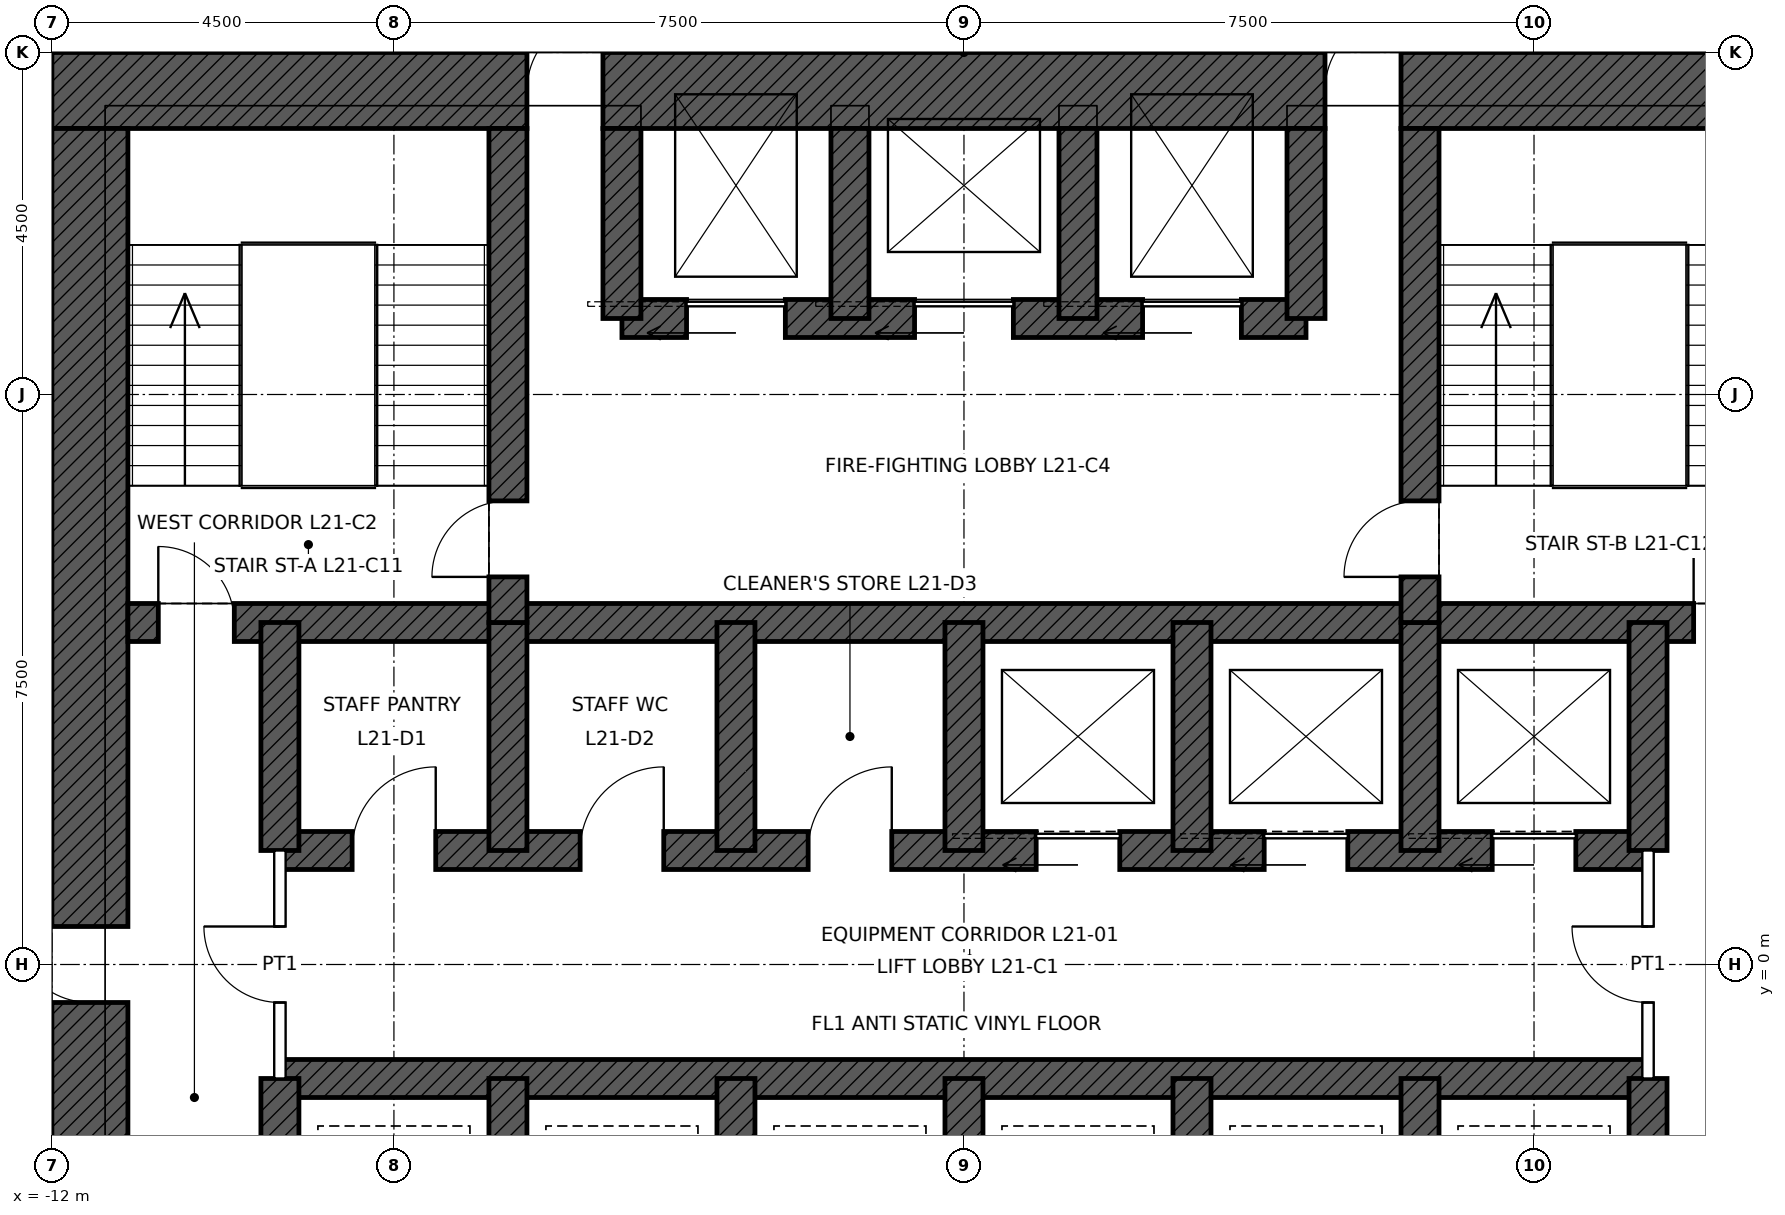
"""IFC4 building model, lengths in metres.
Left out: names, types, materials, properties, quantities, classifications, styles, units other than length and angle.
Written with IfcOpenShell. Run it as: python <this file> out.ifc"""

import sys

from ifc_helpers import new_model, si_unit, direction, frame, frame_2d, origin, place, context, subcontext, project, spatial, rectangle, extrude, element, fill, save


model = new_model("IFC4")
c1 = context("Model", 3, precision=1e-05, world=origin(), true_north=direction((0.0, 1.0)))
c2 = subcontext(c1, "Body", "Model", "MODEL_VIEW")
j1 = project(units=[si_unit("LENGTHUNIT", "METRE"), si_unit("PLANEANGLEUNIT", "RADIAN")], contexts=[c1])
p1 = place(None, origin())
s1 = spatial("IfcSite", under=j1, at=p1, CompositionType="ELEMENT")
p2 = place(p1, origin())
s2 = spatial("IfcBuilding", under=s1, at=p2, CompositionType="ELEMENT")
p3 = place(p2, frame((0.0, 0.0, 108.9)))
s3 = spatial("IfcBuildingStorey", under=s2, at=p3, CompositionType="ELEMENT", Elevation=108.9)
p4 = place(p3, frame((-12.0, 11.5, 0.0), z_axis=(0.0, 0.0, 1.0), x_axis=(1.0, 0.0, 0.0)))
e1 = element("IfcWall", 1, at=p4, inside=s3, PredefinedType="SHEAR", context=c2, shape_type="SweptSolid", body=[
    extrude(rectangle(XDim=24.0, YDim=1.0, at=frame_2d((12.0, 0.0))), origin(), (0.0, 0.0, 1.0), 4.5),
])
p5 = place(p4, frame((6.25, 0.0, 0.0)))
e2 = element("IfcOpeningElement", 2, at=p5, cuts=e1, PredefinedType="OPENING", context=c2, shape_type="SweptSolid", body=[
    extrude(rectangle(XDim=1.0, YDim=2.4, at=frame_2d((0.5, 1.2))), frame((0.0, 0.51, 0.0), z_axis=(0.0, -1.0, 0.0), x_axis=(1.0, 0.0, 0.0)), (0.0, 0.0, 1.0), 1.02),
])
p6 = place(p4, frame((16.75, 0.0, 0.0)))
e3 = element("IfcOpeningElement", 3, at=p6, cuts=e1, PredefinedType="OPENING", context=c2, shape_type="SweptSolid", body=[
    extrude(rectangle(XDim=1.0, YDim=2.4, at=frame_2d((0.5, 1.2))), frame((0.0, 0.51, 0.0), z_axis=(0.0, -1.0, 0.0), x_axis=(1.0, 0.0, 0.0)), (0.0, 0.0, 1.0), 1.02),
])
p7 = place(p3, frame((-11.5, -11.0, 0.0), z_axis=(0.0, 0.0, 1.0), x_axis=(0.0, 1.0, 0.0)))
e4 = element("IfcWall", 4, at=p7, inside=s3, PredefinedType="SHEAR", context=c2, shape_type="SweptSolid", body=[
    extrude(rectangle(XDim=22.0, YDim=1.0, at=frame_2d((11.0, 0.0))), origin(), (0.0, 0.0, 1.0), 4.5),
])
p8 = place(p7, frame((10.5, 0.0, 0.0)))
e5 = element("IfcOpeningElement", 5, at=p8, cuts=e4, PredefinedType="OPENING", context=c2, shape_type="SweptSolid", body=[
    extrude(rectangle(XDim=1.0, YDim=2.4, at=frame_2d((0.5, 1.2))), frame((0.0, 0.51, 0.0), z_axis=(0.0, -1.0, 0.0), x_axis=(1.0, 0.0, 0.0)), (0.0, 0.0, 1.0), 1.02),
])
p9 = place(p3, frame((-11.0, 4.5, 0.0), z_axis=(0.0, 0.0, 1.0), x_axis=(1.0, 0.0, 0.0)))
e6 = element("IfcWall", 6, at=p9, inside=s3, PredefinedType="SHEAR", context=c2, shape_type="SweptSolid", body=[
    extrude(rectangle(XDim=22.0, YDim=0.5, at=frame_2d((11.0, 0.0))), origin(), (0.0, 0.0, 1.0), 4.5),
])
p10 = place(p9, frame((0.4, 0.0, 0.0)))
e7 = element("IfcOpeningElement", 7, at=p10, cuts=e6, PredefinedType="OPENING", context=c2, shape_type="SweptSolid", body=[
    extrude(rectangle(XDim=1.0, YDim=2.1, at=frame_2d((0.5, 1.05))), frame((0.0, 0.26, 0.0), z_axis=(0.0, -1.0, 0.0), x_axis=(1.0, 0.0, 0.0)), (0.0, 0.0, 1.0), 0.52),
])
p11 = place(p9, frame((20.6, 0.0, 0.0)))
e8 = element("IfcOpeningElement", 8, at=p11, cuts=e6, PredefinedType="OPENING", context=c2, shape_type="SweptSolid", body=[
    extrude(rectangle(XDim=1.0, YDim=2.1, at=frame_2d((0.5, 1.05))), frame((0.0, 0.26, 0.0), z_axis=(0.0, -1.0, 0.0), x_axis=(1.0, 0.0, 0.0)), (0.0, 0.0, 1.0), 0.52),
])
p12 = place(p3, frame((-9.0, 1.5, 0.0), z_axis=(0.0, 0.0, 1.0), x_axis=(1.0, 0.0, 0.0)))
e9 = element("IfcWall", 9, at=p12, inside=s3, PredefinedType="SHEAR", context=c2, shape_type="SweptSolid", body=[
    extrude(rectangle(XDim=18.0, YDim=0.5, at=frame_2d((9.0, 0.0))), origin(), (0.0, 0.0, 1.0), 4.5),
])
p13 = place(p12, frame((9.95, 0.0, 0.0)))
e10 = element("IfcOpeningElement", 10, at=p13, cuts=e9, PredefinedType="OPENING", context=c2, shape_type="SweptSolid", body=[
    extrude(rectangle(XDim=1.1, YDim=2.1, at=frame_2d((0.55, 1.05))), frame((0.0, 0.26, 0.0), z_axis=(0.0, -1.0, 0.0), x_axis=(1.0, 0.0, 0.0)), (0.0, 0.0, 1.0), 0.52),
])
p14 = place(p12, frame((12.95, 0.0, 0.0)))
e11 = element("IfcOpeningElement", 11, at=p14, cuts=e9, PredefinedType="OPENING", context=c2, shape_type="SweptSolid", body=[
    extrude(rectangle(XDim=1.1, YDim=2.1, at=frame_2d((0.55, 1.05))), frame((0.0, 0.26, 0.0), z_axis=(0.0, -1.0, 0.0), x_axis=(1.0, 0.0, 0.0)), (0.0, 0.0, 1.0), 0.52),
])
p15 = place(p12, frame((15.95, 0.0, 0.0)))
e12 = element("IfcOpeningElement", 12, at=p15, cuts=e9, PredefinedType="OPENING", context=c2, shape_type="SweptSolid", body=[
    extrude(rectangle(XDim=1.1, YDim=2.1, at=frame_2d((0.55, 1.05))), frame((0.0, 0.26, 0.0), z_axis=(0.0, -1.0, 0.0), x_axis=(1.0, 0.0, 0.0)), (0.0, 0.0, 1.0), 0.52),
])
p16 = place(p12, frame((0.95, 0.0, 0.0)))
e13 = element("IfcOpeningElement", 13, at=p16, cuts=e9, PredefinedType="OPENING", context=c2, shape_type="SweptSolid", body=[
    extrude(rectangle(XDim=1.1, YDim=2.1, at=frame_2d((0.55, 1.05))), frame((0.0, 0.26, 0.0), z_axis=(0.0, -1.0, 0.0), x_axis=(1.0, 0.0, 0.0)), (0.0, 0.0, 1.0), 0.52),
])
p17 = place(p12, frame((3.95, 0.0, 0.0)))
e14 = element("IfcOpeningElement", 14, at=p17, cuts=e9, PredefinedType="OPENING", context=c2, shape_type="SweptSolid", body=[
    extrude(rectangle(XDim=1.1, YDim=2.1, at=frame_2d((0.55, 1.05))), frame((0.0, 0.26, 0.0), z_axis=(0.0, -1.0, 0.0), x_axis=(1.0, 0.0, 0.0)), (0.0, 0.0, 1.0), 0.52),
])
p18 = place(p12, frame((6.95, 0.0, 0.0)))
e15 = element("IfcOpeningElement", 15, at=p18, cuts=e9, PredefinedType="OPENING", context=c2, shape_type="SweptSolid", body=[
    extrude(rectangle(XDim=1.1, YDim=2.1, at=frame_2d((0.55, 1.05))), frame((0.0, 0.26, 0.0), z_axis=(0.0, -1.0, 0.0), x_axis=(1.0, 0.0, 0.0)), (0.0, 0.0, 1.0), 0.52),
])
p19 = place(p3, frame((-9.0, -1.5, 0.0), z_axis=(0.0, 0.0, 1.0), x_axis=(1.0, 0.0, 0.0)))
e16 = element("IfcWall", 16, at=p19, inside=s3, PredefinedType="SHEAR", context=c2, shape_type="SweptSolid", body=[
    extrude(rectangle(XDim=18.0, YDim=0.5, at=frame_2d((9.0, 0.0))), origin(), (0.0, 0.0, 1.0), 4.5),
])
p20 = place(p3, frame((-4.5, 8.5, 0.0), z_axis=(0.0, 0.0, 1.0), x_axis=(1.0, 0.0, 0.0)))
e17 = element("IfcWall", 17, at=p20, inside=s3, PredefinedType="SHEAR", context=c2, shape_type="SweptSolid", body=[
    extrude(rectangle(XDim=9.0, YDim=0.5, at=frame_2d((4.5, 0.0))), origin(), (0.0, 0.0, 1.0), 4.5),
])
p21 = place(p20, frame((0.85, 0.0, 0.0)))
e18 = element("IfcOpeningElement", 18, at=p21, cuts=e17, PredefinedType="OPENING", context=c2, shape_type="SweptSolid", body=[
    extrude(rectangle(XDim=1.3, YDim=2.4, at=frame_2d((0.65, 1.2))), frame((0.0, 0.26, 0.0), z_axis=(0.0, -1.0, 0.0), x_axis=(1.0, 0.0, 0.0)), (0.0, 0.0, 1.0), 0.52),
])
p22 = place(p20, frame((6.85, 0.0, 0.0)))
e19 = element("IfcOpeningElement", 19, at=p22, cuts=e17, PredefinedType="OPENING", context=c2, shape_type="SweptSolid", body=[
    extrude(rectangle(XDim=1.3, YDim=2.4, at=frame_2d((0.65, 1.2))), frame((0.0, 0.26, 0.0), z_axis=(0.0, -1.0, 0.0), x_axis=(1.0, 0.0, 0.0)), (0.0, 0.0, 1.0), 0.52),
])
p23 = place(p20, frame((3.85, 0.0, 0.0)))
e20 = element("IfcOpeningElement", 20, at=p23, cuts=e17, PredefinedType="OPENING", context=c2, shape_type="SweptSolid", body=[
    extrude(rectangle(XDim=1.3, YDim=2.4, at=frame_2d((0.65, 1.2))), frame((0.0, 0.26, 0.0), z_axis=(0.0, -1.0, 0.0), x_axis=(1.0, 0.0, 0.0)), (0.0, 0.0, 1.0), 0.52),
])
for number, where, z_axis, x_axis in (
    (21, (-9.0, 1.5, 0.0), (0.0, 0.0, 1.0), (0.0, 1.0, 0.0)),
    (22, (9.0, 1.5, 0.0), (0.0, 0.0, 1.0), (0.0, 1.0, 0.0)),
    (23, (-9.0, -4.5, 0.0), (0.0, 0.0, 1.0), (0.0, 1.0, 0.0)),
    (24, (9.0, -4.5, 0.0), (0.0, 0.0, 1.0), (0.0, 1.0, 0.0)),
    (25, (-6.0, 1.5, 0.0), (0.0, 0.0, 1.0), (0.0, 1.0, 0.0)),
    (26, (-3.0, 1.5, 0.0), (0.0, 0.0, 1.0), (0.0, 1.0, 0.0)),
    (27, (0.0, 1.5, 0.0), (0.0, 0.0, 1.0), (0.0, 1.0, 0.0)),
    (28, (3.0, 1.5, 0.0), (0.0, 0.0, 1.0), (0.0, 1.0, 0.0)),
    (29, (6.0, 1.5, 0.0), (0.0, 0.0, 1.0), (0.0, 1.0, 0.0)),
    (30, (-6.0, -4.5, 0.0), (0.0, 0.0, 1.0), (0.0, 1.0, 0.0)),
    (31, (-3.0, -4.5, 0.0), (0.0, 0.0, 1.0), (0.0, 1.0, 0.0)),
    (32, (0.0, -4.5, 0.0), (0.0, 0.0, 1.0), (0.0, 1.0, 0.0)),
    (33, (3.0, -4.5, 0.0), (0.0, 0.0, 1.0), (0.0, 1.0, 0.0)),
    (34, (6.0, -4.5, 0.0), (0.0, 0.0, 1.0), (0.0, 1.0, 0.0)),
):
    element("IfcWall", number, at=place(p3, frame(where, z_axis=z_axis, x_axis=x_axis)), inside=s3, PredefinedType="SHEAR", context=c2, shape_type="SweptSolid", body=[
        extrude(rectangle(XDim=3.0, YDim=0.5, at=frame_2d((1.5, 0.0))), origin(), (0.0, 0.0, 1.0), 4.5),
    ])
p24 = place(p3, frame((-6.0, 4.5, 0.0), z_axis=(0.0, 0.0, 1.0), x_axis=(0.0, 1.0, 0.0)))
e35 = element("IfcWall", 35, at=p24, inside=s3, PredefinedType="SHEAR", context=c2, shape_type="SweptSolid", body=[
    extrude(rectangle(XDim=6.5, YDim=0.5, at=frame_2d((3.25, 0.0))), origin(), (0.0, 0.0, 1.0), 4.5),
])
p25 = place(p24, frame((0.6, 0.0, 0.0)))
e36 = element("IfcOpeningElement", 36, at=p25, cuts=e35, PredefinedType="OPENING", context=c2, shape_type="SweptSolid", body=[
    extrude(rectangle(XDim=1.0, YDim=2.1, at=frame_2d((0.5, 1.05))), frame((0.0, 0.26, 0.0), z_axis=(0.0, -1.0, 0.0), x_axis=(1.0, 0.0, 0.0)), (0.0, 0.0, 1.0), 0.52),
])
p26 = place(p3, frame((6.0, 4.5, 0.0), z_axis=(0.0, 0.0, 1.0), x_axis=(0.0, 1.0, 0.0)))
e37 = element("IfcWall", 37, at=p26, inside=s3, PredefinedType="SHEAR", context=c2, shape_type="SweptSolid", body=[
    extrude(rectangle(XDim=6.5, YDim=0.5, at=frame_2d((3.25, 0.0))), origin(), (0.0, 0.0, 1.0), 4.5),
])
p27 = place(p26, frame((0.6, 0.0, 0.0)))
e38 = element("IfcOpeningElement", 38, at=p27, cuts=e37, PredefinedType="OPENING", context=c2, shape_type="SweptSolid", body=[
    extrude(rectangle(XDim=1.0, YDim=2.1, at=frame_2d((0.5, 1.05))), frame((0.0, 0.26, 0.0), z_axis=(0.0, -1.0, 0.0), x_axis=(1.0, 0.0, 0.0)), (0.0, 0.0, 1.0), 0.52),
])
for number, where, z_axis, x_axis in (
    (39, (-4.5, 8.5, 0.0), (0.0, 0.0, 1.0), (0.0, 1.0, 0.0)),
    (40, (4.5, 8.5, 0.0), (0.0, 0.0, 1.0), (0.0, 1.0, 0.0)),
    (41, (-1.5, 8.5, 0.0), (0.0, 0.0, 1.0), (0.0, 1.0, 0.0)),
    (42, (1.5, 8.5, 0.0), (0.0, 0.0, 1.0), (0.0, 1.0, 0.0)),
):
    element("IfcWall", number, at=place(p3, frame(where, z_axis=z_axis, x_axis=x_axis)), inside=s3, PredefinedType="SHEAR", context=c2, shape_type="SweptSolid", body=[
        extrude(rectangle(XDim=2.5, YDim=0.5, at=frame_2d((1.25, 0.0))), origin(), (0.0, 0.0, 1.0), 4.5),
    ])
p28 = place(p3, frame((-9.0, -1.5, 0.0), z_axis=(0.0, 0.0, 1.0), x_axis=(0.0, 1.0, 0.0)))
e43 = element("IfcWall", 43, at=p28, inside=s3, PredefinedType="PARTITIONING", context=c2, shape_type="SweptSolid", body=[
    extrude(rectangle(XDim=3.0, YDim=0.15, at=frame_2d((1.5, 0.0))), origin(), (0.0, 0.0, 1.0), 4.25),
])
p29 = place(p28, frame((1.0, 0.0, 0.0)))
e44 = element("IfcOpeningElement", 44, at=p29, cuts=e43, PredefinedType="OPENING", context=c2, shape_type="SweptSolid", body=[
    extrude(rectangle(XDim=1.0, YDim=2.4, at=frame_2d((0.5, 1.2))), frame((0.0, 0.085, 0.0), z_axis=(0.0, -1.0, 0.0), x_axis=(1.0, 0.0, 0.0)), (0.0, 0.0, 1.0), 0.17),
])
p30 = place(p3, frame((9.0, -1.5, 0.0), z_axis=(0.0, 0.0, 1.0), x_axis=(0.0, 1.0, 0.0)))
e45 = element("IfcWall", 45, at=p30, inside=s3, PredefinedType="PARTITIONING", context=c2, shape_type="SweptSolid", body=[
    extrude(rectangle(XDim=3.0, YDim=0.15, at=frame_2d((1.5, 0.0))), origin(), (0.0, 0.0, 1.0), 4.25),
])
p31 = place(p30, frame((1.0, 0.0, 0.0)))
e46 = element("IfcOpeningElement", 46, at=p31, cuts=e45, PredefinedType="OPENING", context=c2, shape_type="SweptSolid", body=[
    extrude(rectangle(XDim=1.0, YDim=2.4, at=frame_2d((0.5, 1.2))), frame((0.0, 0.085, 0.0), z_axis=(0.0, -1.0, 0.0), x_axis=(1.0, 0.0, 0.0)), (0.0, 0.0, 1.0), 0.17),
])
p32 = place(p10, origin())
e47 = element("IfcDoor", 47, at=p32, inside=s3, OperationType="SINGLE_SWING_LEFT", PredefinedType="DOOR", context=c2, shape_type="SweptSolid", body=[
    extrude(rectangle(XDim=1.0, YDim=2.1, at=frame_2d((0.5, 1.05))), frame((0.0, 0.025, 0.0), z_axis=(0.0, -1.0, 0.0), x_axis=(1.0, 0.0, 0.0)), (0.0, 0.0, 1.0), 0.05),
])
fill(e7, e47)
p33 = place(p11, origin())
e48 = element("IfcDoor", 48, at=p33, inside=s3, OperationType="SINGLE_SWING_LEFT", PredefinedType="DOOR", context=c2, shape_type="SweptSolid", body=[
    extrude(rectangle(XDim=1.0, YDim=2.1, at=frame_2d((0.5, 1.05))), frame((0.0, 0.025, 0.0), z_axis=(0.0, -1.0, 0.0), x_axis=(1.0, 0.0, 0.0)), (0.0, 0.0, 1.0), 0.05),
])
fill(e8, e48)
p34 = place(p25, origin())
e49 = element("IfcDoor", 49, at=p34, inside=s3, OperationType="SINGLE_SWING_LEFT", PredefinedType="DOOR", context=c2, shape_type="SweptSolid", body=[
    extrude(rectangle(XDim=1.0, YDim=2.1, at=frame_2d((0.5, 1.05))), frame((0.0, 0.025, 0.0), z_axis=(0.0, -1.0, 0.0), x_axis=(1.0, 0.0, 0.0)), (0.0, 0.0, 1.0), 0.05),
])
fill(e36, e49)
p35 = place(p27, origin())
e50 = element("IfcDoor", 50, at=p35, inside=s3, OperationType="SINGLE_SWING_LEFT", PredefinedType="DOOR", context=c2, shape_type="SweptSolid", body=[
    extrude(rectangle(XDim=1.0, YDim=2.1, at=frame_2d((0.5, 1.05))), frame((0.0, 0.025, 0.0), z_axis=(0.0, -1.0, 0.0), x_axis=(1.0, 0.0, 0.0)), (0.0, 0.0, 1.0), 0.05),
])
fill(e38, e50)
p36 = place(p5, origin())
e51 = element("IfcDoor", 51, at=p36, inside=s3, OperationType="SINGLE_SWING_RIGHT", PredefinedType="DOOR", context=c2, shape_type="SweptSolid", body=[
    extrude(rectangle(XDim=1.0, YDim=2.4, at=frame_2d((0.5, 1.2))), frame((0.0, 0.485, 0.0), z_axis=(0.0, -1.0, 0.0), x_axis=(1.0, 0.0, 0.0)), (0.0, 0.0, 1.0), 0.05),
])
fill(e2, e51)
p37 = place(p6, origin())
e52 = element("IfcDoor", 52, at=p37, inside=s3, OperationType="SINGLE_SWING_RIGHT", PredefinedType="DOOR", context=c2, shape_type="SweptSolid", body=[
    extrude(rectangle(XDim=1.0, YDim=2.4, at=frame_2d((0.5, 1.2))), frame((0.0, 0.485, 0.0), z_axis=(0.0, -1.0, 0.0), x_axis=(1.0, 0.0, 0.0)), (0.0, 0.0, 1.0), 0.05),
])
fill(e3, e52)
p38 = place(p8, origin())
e53 = element("IfcDoor", 53, at=p38, inside=s3, OperationType="SINGLE_SWING_RIGHT", PredefinedType="DOOR", context=c2, shape_type="SweptSolid", body=[
    extrude(rectangle(XDim=1.0, YDim=2.4, at=frame_2d((0.5, 1.2))), frame((0.0, 0.485, 0.0), z_axis=(0.0, -1.0, 0.0), x_axis=(1.0, 0.0, 0.0)), (0.0, 0.0, 1.0), 0.05),
])
fill(e5, e53)
p39 = place(p21, origin())
e54 = element("IfcDoor", 54, at=p39, inside=s3, OperationType="SLIDING_TO_LEFT", PredefinedType="DOOR", context=c2, shape_type="SweptSolid", body=[
    extrude(rectangle(XDim=1.3, YDim=2.4, at=frame_2d((0.65, 1.2))), frame((0.0, 0.025, 0.0), z_axis=(0.0, -1.0, 0.0), x_axis=(1.0, 0.0, 0.0)), (0.0, 0.0, 1.0), 0.05),
])
fill(e18, e54)
p40 = place(p22, origin())
e55 = element("IfcDoor", 55, at=p40, inside=s3, OperationType="SLIDING_TO_LEFT", PredefinedType="DOOR", context=c2, shape_type="SweptSolid", body=[
    extrude(rectangle(XDim=1.3, YDim=2.4, at=frame_2d((0.65, 1.2))), frame((0.0, 0.025, 0.0), z_axis=(0.0, -1.0, 0.0), x_axis=(1.0, 0.0, 0.0)), (0.0, 0.0, 1.0), 0.05),
])
fill(e19, e55)
p41 = place(p23, origin())
e56 = element("IfcDoor", 56, at=p41, inside=s3, OperationType="SLIDING_TO_LEFT", PredefinedType="DOOR", context=c2, shape_type="SweptSolid", body=[
    extrude(rectangle(XDim=1.3, YDim=2.4, at=frame_2d((0.65, 1.2))), frame((0.0, 0.025, 0.0), z_axis=(0.0, -1.0, 0.0), x_axis=(1.0, 0.0, 0.0)), (0.0, 0.0, 1.0), 0.05),
])
fill(e20, e56)
p42 = place(p13, origin())
e57 = element("IfcDoor", 57, at=p42, inside=s3, OperationType="SLIDING_TO_LEFT", PredefinedType="DOOR", context=c2, shape_type="SweptSolid", body=[
    extrude(rectangle(XDim=1.1, YDim=2.1, at=frame_2d((0.55, 1.05))), frame((0.0, 0.025, 0.0), z_axis=(0.0, -1.0, 0.0), x_axis=(1.0, 0.0, 0.0)), (0.0, 0.0, 1.0), 0.05),
])
fill(e10, e57)
p43 = place(p14, origin())
e58 = element("IfcDoor", 58, at=p43, inside=s3, OperationType="SLIDING_TO_LEFT", PredefinedType="DOOR", context=c2, shape_type="SweptSolid", body=[
    extrude(rectangle(XDim=1.1, YDim=2.1, at=frame_2d((0.55, 1.05))), frame((0.0, 0.025, 0.0), z_axis=(0.0, -1.0, 0.0), x_axis=(1.0, 0.0, 0.0)), (0.0, 0.0, 1.0), 0.05),
])
fill(e11, e58)
p44 = place(p15, origin())
e59 = element("IfcDoor", 59, at=p44, inside=s3, OperationType="SLIDING_TO_LEFT", PredefinedType="DOOR", context=c2, shape_type="SweptSolid", body=[
    extrude(rectangle(XDim=1.1, YDim=2.1, at=frame_2d((0.55, 1.05))), frame((0.0, 0.025, 0.0), z_axis=(0.0, -1.0, 0.0), x_axis=(1.0, 0.0, 0.0)), (0.0, 0.0, 1.0), 0.05),
])
fill(e12, e59)
p45 = place(p29, origin())
e60 = element("IfcDoor", 60, at=p45, inside=s3, OperationType="SINGLE_SWING_RIGHT", PredefinedType="DOOR", context=c2, shape_type="SweptSolid", body=[
    extrude(rectangle(XDim=1.0, YDim=2.4, at=frame_2d((0.5, 1.2))), frame((0.0, 0.025, 0.0), z_axis=(0.0, -1.0, 0.0), x_axis=(1.0, 0.0, 0.0)), (0.0, 0.0, 1.0), 0.05),
])
fill(e44, e60)
p46 = place(p31, origin())
e61 = element("IfcDoor", 61, at=p46, inside=s3, OperationType="SINGLE_SWING_RIGHT", PredefinedType="DOOR", context=c2, shape_type="SweptSolid", body=[
    extrude(rectangle(XDim=1.0, YDim=2.4, at=frame_2d((0.5, 1.2))), frame((0.0, 0.025, 0.0), z_axis=(0.0, -1.0, 0.0), x_axis=(1.0, 0.0, 0.0)), (0.0, 0.0, 1.0), 0.05),
])
fill(e46, e61)
p47 = place(p16, origin())
e62 = element("IfcDoor", 62, at=p47, inside=s3, OperationType="SINGLE_SWING_RIGHT", PredefinedType="DOOR", context=c2, shape_type="SweptSolid", body=[
    extrude(rectangle(XDim=1.1, YDim=2.1, at=frame_2d((0.55, 1.05))), frame((0.0, 0.025, 0.0), z_axis=(0.0, -1.0, 0.0), x_axis=(1.0, 0.0, 0.0)), (0.0, 0.0, 1.0), 0.05),
])
fill(e13, e62)
p48 = place(p17, origin())
e63 = element("IfcDoor", 63, at=p48, inside=s3, OperationType="SINGLE_SWING_RIGHT", PredefinedType="DOOR", context=c2, shape_type="SweptSolid", body=[
    extrude(rectangle(XDim=1.1, YDim=2.1, at=frame_2d((0.55, 1.05))), frame((0.0, 0.025, 0.0), z_axis=(0.0, -1.0, 0.0), x_axis=(1.0, 0.0, 0.0)), (0.0, 0.0, 1.0), 0.05),
])
fill(e14, e63)
p49 = place(p18, origin())
e64 = element("IfcDoor", 64, at=p49, inside=s3, OperationType="SINGLE_SWING_RIGHT", PredefinedType="DOOR", context=c2, shape_type="SweptSolid", body=[
    extrude(rectangle(XDim=1.1, YDim=2.1, at=frame_2d((0.55, 1.05))), frame((0.0, 0.025, 0.0), z_axis=(0.0, -1.0, 0.0), x_axis=(1.0, 0.0, 0.0)), (0.0, 0.0, 1.0), 0.05),
])
fill(e15, e64)
save(model, sys.argv[1])
